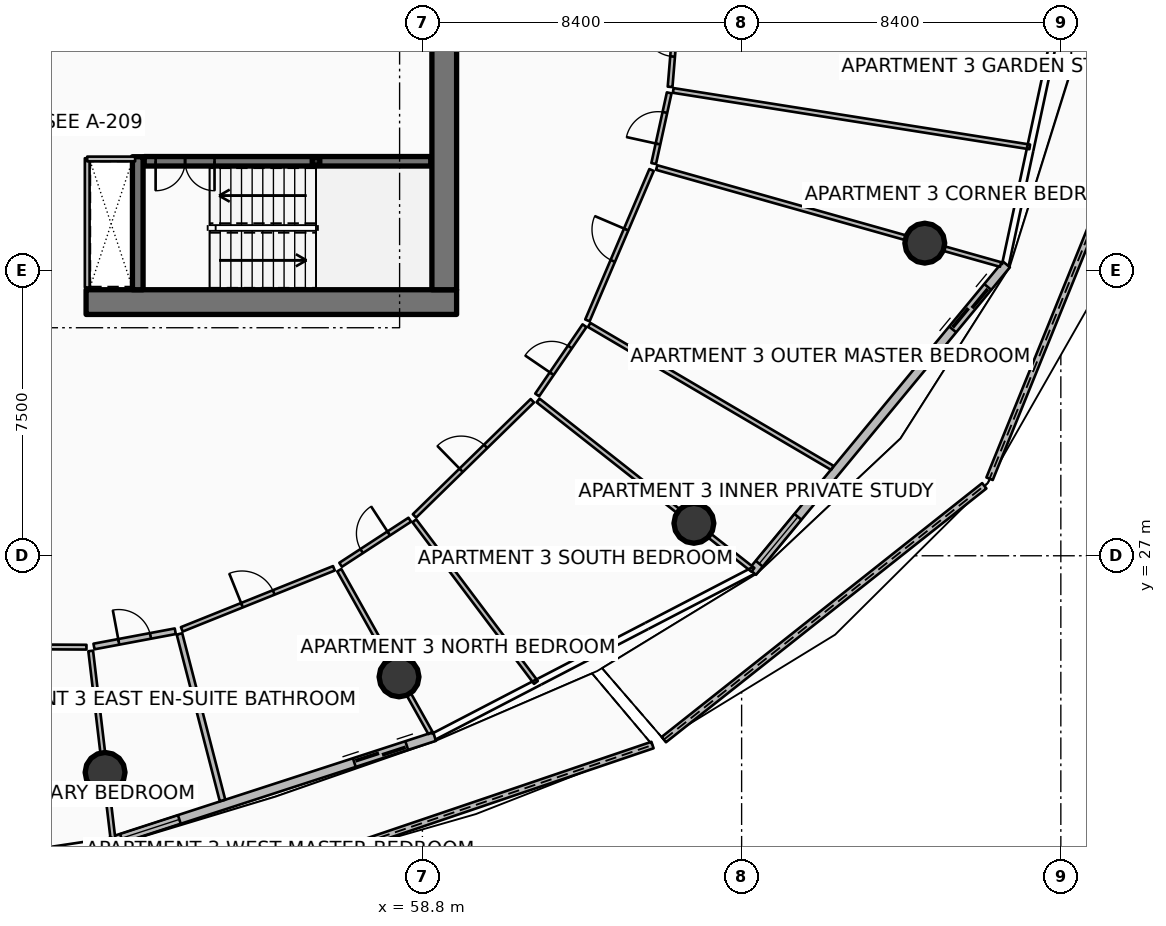
"""IFC4 building model, lengths in metres.
Left out: names, types, materials, properties, quantities, classifications, styles, units other than length and angle.
Written with IfcOpenShell. Run it as: python <this file> out.ifc"""

import sys

from ifc_helpers import new_model, si_unit, direction, frame, frame_2d, origin, origin_2d, place, context, subcontext, project, spatial, polyline, rectangle, hollow_rectangle, circle, outline, extrude, element, fill, save


model = new_model("IFC4")
c1 = context("Model", 3, precision=1e-05, world=origin(), true_north=direction((0.0, 1.0)))
c2 = subcontext(c1, "Body", "Model", "MODEL_VIEW")
j1 = project(units=[si_unit("LENGTHUNIT", "METRE"), si_unit("PLANEANGLEUNIT", "RADIAN")], contexts=[c1])
p1 = place(None, origin())
s1 = spatial("IfcSite", under=j1, at=p1, CompositionType="ELEMENT")
p2 = place(p1, origin())
s2 = spatial("IfcBuilding", under=s1, at=p2, CompositionType="ELEMENT")
p3 = place(p2, frame((0.0, 0.0, 187.8)))
s3 = spatial("IfcBuildingStorey", under=s2, at=p3, CompositionType="ELEMENT", Elevation=187.8)
p4 = place(p3, frame((49.95, 33.675, 0.0), z_axis=(0.0, 0.0, 1.0), x_axis=(1.0, 0.0, 0.0)))
e1 = element("IfcWall", 1, at=p4, inside=s3, PredefinedType="SHEAR", context=c2, shape_type="SweptSolid", body=[
    extrude(rectangle(XDim=9.75, YDim=0.65, at=frame_2d((4.875, 0.0))), origin(), (0.0, 0.0, 1.0), 3.75),
])
p5 = place(p3, frame((59.375, 34.0, 0.0), z_axis=(0.0, 0.0, 1.0), x_axis=(0.0, 1.0, 0.0)))
e2 = element("IfcWall", 2, at=p5, inside=s3, PredefinedType="SHEAR", context=c2, shape_type="SweptSolid", body=[
    extrude(rectangle(XDim=16.0, YDim=0.65, at=frame_2d((8.0, 0.0))), origin(), (0.0, 0.0, 1.0), 3.75),
])
p6 = place(p3, frame((51.31, 34.0, 0.0), z_axis=(0.0, 0.0, 1.0), x_axis=(0.0, 1.0, 0.0)))
e3 = element("IfcWall", 3, at=p6, inside=s3, PredefinedType="SHEAR", context=c2, shape_type="SweptSolid", body=[
    extrude(rectangle(XDim=3.5, YDim=0.28, at=frame_2d((1.75, 0.0))), origin(), (0.0, 0.0, 1.0), 3.75),
])
p7 = place(p3, frame((56.0, 37.38, 0.0), z_axis=(0.0, 0.0, 1.0), x_axis=(1.0, 0.0, 0.0)))
e4 = element("IfcColumn", 4, at=p7, inside=s3, PredefinedType="COLUMN", context=c2, shape_type="SweptSolid", body=[
    extrude(hollow_rectangle(XDim=0.2, YDim=0.2, WallThickness=0.01, InnerFilletRadius=0.01, OuterFilletRadius=0.02, at=origin_2d()), origin(), (0.0, 0.0, 1.0), 1.67),
])
for number, where, z_axis, x_axis in (
    (5, (50.45, 21.3, 0.0), (0.0, 0.0, 1.0), (1.0, 0.0, 0.0)),
    (6, (58.185, 23.814, 0.0), (0.0, 0.0, 1.0), (1.0, 0.0, 0.0)),
    (7, (65.944, 27.854, 0.0), (0.0, 0.0, 1.0), (1.0, 0.0, 0.0)),
    (8, (72.02, 35.226, 0.0), (0.0, 0.0, 1.0), (1.0, 0.0, 0.0)),
):
    element("IfcColumn", number, at=place(p3, frame(where, z_axis=z_axis, x_axis=x_axis)), inside=s3, PredefinedType="COLUMN", context=c2, shape_type="SweptSolid", body=[
        extrude(circle(Radius=0.525, at=origin_2d()), origin(), (0.0, 0.0, 1.0), 3.5),
    ])
p8 = place(p3, frame((55.634, 18.894, 0.0), z_axis=(0.0, 0.0, 1.0), x_axis=(0.947048433124, 0.32109074312, 0.0)))
e9 = element("IfcWall", 9, at=p8, inside=s3, PredefinedType="PARAPET", context=c2, shape_type="SweptSolid", body=[
    extrude(outline(polyline([(0.0, 0.0), (9.736, 0.0), (9.736, 1.747), (4.868, 1.562), (0.0, 1.348), (0.0, 0.0)])), frame((0.0, 0.09, 0.0), z_axis=(0.0, -1.0, 0.0), x_axis=(1.0, 0.0, 0.0)), (0.0, 0.0, 1.0), 0.18),
])
p9 = place(p3, frame((65.153, 22.163, 0.0), z_axis=(0.0, 0.0, 1.0), x_axis=(0.783919701346, 0.620862224524, 0.0)))
e10 = element("IfcWall", 10, at=p9, inside=s3, PredefinedType="PARAPET", context=c2, shape_type="SweptSolid", body=[
    extrude(outline(polyline([(0.0, 0.0), (10.756, 0.0), (10.756, 1.832), (5.378, 1.853), (0.0, 1.756), (0.0, 0.0)])), frame((0.0, 0.09, 0.0), z_axis=(0.0, -1.0, 0.0), x_axis=(1.0, 0.0, 0.0)), (0.0, 0.0, 1.0), 0.18),
])
p10 = place(p3, frame((73.725, 29.027, 0.0), z_axis=(0.0, 0.0, 1.0), x_axis=(0.375821400088, 0.926692114586, 0.0)))
e11 = element("IfcWall", 11, at=p10, inside=s3, PredefinedType="PARAPET", context=c2, shape_type="SweptSolid", body=[
    extrude(outline(polyline([(0.0, 0.0), (11.257, 0.0), (11.257, 1.497), (5.628, 1.696), (0.0, 1.832), (0.0, 0.0)])), frame((0.0, 0.09, 0.0), z_axis=(0.0, -1.0, 0.0), x_axis=(1.0, 0.0, 0.0)), (0.0, 0.0, 1.0), 0.18),
])
p11 = place(p3, frame((50.616, 19.481, 0.0), z_axis=(0.0, 0.0, 1.0), x_axis=(0.951058543936, 0.309010753869, 0.0)))
e12 = element("IfcWall", 12, at=p11, inside=s3, PredefinedType="SOLIDWALL", context=c2, shape_type="SweptSolid", body=[
    extrude(rectangle(XDim=8.942, YDim=0.24, at=frame_2d((4.471, 0.0))), origin(), (0.0, 0.0, 1.0), 2.45),
])
p12 = place(p11, frame((6.722, 0.0, 0.0)))
e13 = element("IfcOpeningElement", 13, at=p12, cuts=e12, PredefinedType="OPENING", context=c2, shape_type="SweptSolid", body=[
    extrude(rectangle(XDim=1.45, YDim=2.15, at=frame_2d((0.725, 1.075))), frame((0.0, 0.13, 0.0), z_axis=(0.0, -1.0, 0.0), x_axis=(1.0, 0.0, 0.0)), (0.0, 0.0, 1.0), 0.26),
])
p13 = place(p11, frame((0.28, 0.0, 0.65)))
e14 = element("IfcOpeningElement", 14, at=p13, cuts=e12, PredefinedType="OPENING", context=c2, shape_type="SweptSolid", body=[
    extrude(rectangle(XDim=1.6, YDim=1.5, at=frame_2d((0.8, 0.75))), frame((0.0, 0.13, 0.0), z_axis=(0.0, -1.0, 0.0), x_axis=(1.0, 0.0, 0.0)), (0.0, 0.0, 1.0), 0.26),
])
p14 = place(p3, frame((67.485, 26.576, 0.0), z_axis=(0.0, 0.0, 1.0), x_axis=(0.636759394418, 0.771062561418, 0.0)))
e15 = element("IfcWall", 15, at=p14, inside=s3, PredefinedType="SOLIDWALL", context=c2, shape_type="SweptSolid", body=[
    extrude(rectangle(XDim=10.494, YDim=0.24, at=frame_2d((5.247, 0.0))), origin(), (0.0, 0.0, 1.0), 2.45),
])
p15 = place(p14, frame((8.274, 0.0, 0.0)))
e16 = element("IfcOpeningElement", 16, at=p15, cuts=e15, PredefinedType="OPENING", context=c2, shape_type="SweptSolid", body=[
    extrude(rectangle(XDim=1.45, YDim=2.15, at=frame_2d((0.725, 1.075))), frame((0.0, 0.13, 0.0), z_axis=(0.0, -1.0, 0.0), x_axis=(1.0, 0.0, 0.0)), (0.0, 0.0, 1.0), 0.26),
])
p16 = place(p14, frame((0.28, 0.0, 0.65)))
e17 = element("IfcOpeningElement", 17, at=p16, cuts=e15, PredefinedType="OPENING", context=c2, shape_type="SweptSolid", body=[
    extrude(rectangle(XDim=1.6, YDim=1.5, at=frame_2d((0.8, 0.75))), frame((0.0, 0.13, 0.0), z_axis=(0.0, -1.0, 0.0), x_axis=(1.0, 0.0, 0.0)), (0.0, 0.0, 1.0), 0.26),
])
p17 = place(p3, frame((51.48, 37.38, 0.0), z_axis=(0.0, 0.0, 1.0), x_axis=(1.0, 0.0, 0.0)))
e18 = element("IfcWall", 18, at=p17, inside=s3, PredefinedType="SOLIDWALL", context=c2, shape_type="SweptSolid", body=[
    extrude(rectangle(XDim=7.54, YDim=0.25, at=frame_2d((3.77, 0.0))), origin(), (0.0, 0.0, 1.0), 3.5),
])
p18 = place(p17, frame((0.3, 0.0, 0.0)))
e19 = element("IfcOpeningElement", 19, at=p18, cuts=e18, PredefinedType="OPENING", context=c2, shape_type="SweptSolid", body=[
    extrude(rectangle(XDim=1.55, YDim=2.15, at=frame_2d((0.775, 1.075))), frame((0.0, 0.135, 0.0), z_axis=(0.0, -1.0, 0.0), x_axis=(1.0, 0.0, 0.0)), (0.0, 0.0, 1.0), 0.27),
])
p19 = place(p3, frame((49.98, 34.06, 0.0), z_axis=(0.0, 0.0, 1.0), x_axis=(0.0, 1.0, 0.0)))
e20 = element("IfcWall", 20, at=p19, inside=s3, PredefinedType="PARTITIONING", context=c2, shape_type="SweptSolid", body=[
    extrude(rectangle(XDim=3.4, YDim=0.125, at=frame_2d((1.7, 0.0))), origin(), (0.0, 0.0, 1.0), 2.94),
])
p20 = place(p3, frame((49.98, 37.44, 0.0), z_axis=(0.0, 0.0, 1.0), x_axis=(1.0, 0.0, 0.0)))
e21 = element("IfcWall", 21, at=p20, inside=s3, PredefinedType="PARTITIONING", context=c2, shape_type="SweptSolid", body=[
    extrude(rectangle(XDim=1.26, YDim=0.125, at=frame_2d((0.63, 0.0))), origin(), (0.0, 0.0, 1.0), 2.94),
])
p21 = place(p3, frame((45.842, 24.616, 0.0), z_axis=(0.0, 0.0, 1.0), x_axis=(0.999987001814, -0.00509864719, 0.0)))
e22 = element("IfcWall", 22, at=p21, inside=s3, PredefinedType="PARTITIONING", context=c2, shape_type="SweptSolid", body=[
    extrude(rectangle(XDim=4.118, YDim=0.125, at=frame_2d((2.059, 0.0))), origin(), (0.0, 0.0, 1.0), 2.94),
])
p22 = place(p21, frame((1.609, 0.0, 0.0)))
e23 = element("IfcOpeningElement", 23, at=p22, cuts=e22, PredefinedType="OPENING", context=c2, shape_type="SweptSolid", body=[
    extrude(rectangle(XDim=0.9, YDim=2.08, at=frame_2d((0.45, 1.04))), frame((0.0, 0.073, 0.0), z_axis=(0.0, -1.0, 0.0), x_axis=(1.0, 0.0, 0.0)), (0.0, 0.0, 1.0), 0.145),
])
p23 = place(p3, frame((50.072, 24.495, 0.0), z_axis=(0.0, 0.0, 1.0), x_axis=(0.11748042549, -0.993075198375, 0.0)))
e24 = element("IfcWall", 24, at=p23, inside=s3, PredefinedType="PARTITIONING", context=c2, shape_type="SweptSolid", body=[
    extrude(rectangle(XDim=5.008, YDim=0.125, at=frame_2d((2.504, 0.0))), origin(), (0.0, 0.0, 1.0), 2.94),
])
p24 = place(p3, frame((50.158, 24.613, 0.0), z_axis=(0.0, 0.0, 1.0), x_axis=(0.982858210634, 0.184363059718, 0.0)))
e25 = element("IfcWall", 25, at=p24, inside=s3, PredefinedType="PARTITIONING", context=c2, shape_type="SweptSolid", body=[
    extrude(rectangle(XDim=2.176, YDim=0.15, at=frame_2d((1.088, 0.0))), origin(), (0.0, 0.0, 1.0), 2.94),
])
p25 = place(p24, frame((0.663, 0.0, 0.0)))
e26 = element("IfcOpeningElement", 26, at=p25, cuts=e25, PredefinedType="OPENING", context=c2, shape_type="SweptSolid", body=[
    extrude(rectangle(XDim=0.85, YDim=2.06, at=frame_2d((0.425, 1.03))), frame((0.0, 0.085, 0.0), z_axis=(0.0, -1.0, 0.0), x_axis=(1.0, 0.0, 0.0)), (0.0, 0.0, 1.0), 0.17),
])
p26 = place(p3, frame((52.408, 24.943, 0.0), z_axis=(0.0, 0.0, 1.0), x_axis=(0.250196217184, -0.968195152284, 0.0)))
e27 = element("IfcWall", 27, at=p26, inside=s3, PredefinedType="PARTITIONING", context=c2, shape_type="SweptSolid", body=[
    extrude(rectangle(XDim=4.525, YDim=0.15, at=frame_2d((2.262, 0.0))), origin(), (0.0, 0.0, 1.0), 2.94),
])
p27 = place(p3, frame((52.469, 25.064, 0.0), z_axis=(0.0, 0.0, 1.0), x_axis=(0.928030941282, 0.372503116796, 0.0)))
e28 = element("IfcWall", 28, at=p27, inside=s3, PredefinedType="PARTITIONING", context=c2, shape_type="SweptSolid", body=[
    extrude(rectangle(XDim=4.312, YDim=0.125, at=frame_2d((2.156, 0.0))), origin(), (0.0, 0.0, 1.0), 2.94),
])
p28 = place(p27, frame((1.706, 0.0, 0.0)))
e29 = element("IfcOpeningElement", 29, at=p28, cuts=e28, PredefinedType="OPENING", context=c2, shape_type="SweptSolid", body=[
    extrude(rectangle(XDim=0.9, YDim=2.08, at=frame_2d((0.45, 1.04))), frame((0.0, 0.073, 0.0), z_axis=(0.0, -1.0, 0.0), x_axis=(1.0, 0.0, 0.0)), (0.0, 0.0, 1.0), 0.145),
])
p29 = place(p3, frame((56.613, 26.621, 0.0), z_axis=(0.0, 0.0, 1.0), x_axis=(0.488583679293, -0.872517041856, 0.0)))
e30 = element("IfcWall", 30, at=p29, inside=s3, PredefinedType="PARTITIONING", context=c2, shape_type="SweptSolid", body=[
    extrude(rectangle(XDim=4.908, YDim=0.125, at=frame_2d((2.454, 0.0))), origin(), (0.0, 0.0, 1.0), 2.94),
])
p30 = place(p3, frame((58.589, 27.92, 0.0), z_axis=(0.0, 0.0, 1.0), x_axis=(0.601049014417, -0.799212163489, 0.0)))
e31 = element("IfcWall", 31, at=p30, inside=s3, PredefinedType="PARTITIONING", context=c2, shape_type="SweptSolid", body=[
    extrude(rectangle(XDim=5.322, YDim=0.125, at=frame_2d((2.661, 0.0))), origin(), (0.0, 0.0, 1.0), 2.94),
])
p31 = place(p3, frame((56.648, 26.762, 0.0), z_axis=(0.0, 0.0, 1.0), x_axis=(0.837746976104, 0.546058608602, 0.0)))
e32 = element("IfcWall", 32, at=p31, inside=s3, PredefinedType="PARTITIONING", context=c2, shape_type="SweptSolid", body=[
    extrude(rectangle(XDim=2.172, YDim=0.125, at=frame_2d((1.086, 0.0))), origin(), (0.0, 0.0, 1.0), 2.94),
])
p32 = place(p31, frame((0.661, 0.0, 0.0)))
e33 = element("IfcOpeningElement", 33, at=p32, cuts=e32, PredefinedType="OPENING", context=c2, shape_type="SweptSolid", body=[
    extrude(rectangle(XDim=0.85, YDim=2.06, at=frame_2d((0.425, 1.03))), frame((0.0, 0.073, 0.0), z_axis=(0.0, -1.0, 0.0), x_axis=(1.0, 0.0, 0.0)), (0.0, 0.0, 1.0), 0.145),
])
p33 = place(p3, frame((58.592, 28.048, 0.0), z_axis=(0.0, 0.0, 1.0), x_axis=(0.715112359848, 0.699009522677, 0.0)))
e34 = element("IfcWall", 34, at=p33, inside=s3, PredefinedType="PARTITIONING", context=c2, shape_type="SweptSolid", body=[
    extrude(rectangle(XDim=4.336, YDim=0.125, at=frame_2d((2.168, 0.0))), origin(), (0.0, 0.0, 1.0), 2.94),
])
p34 = place(p33, frame((1.718, 0.0, 0.0)))
e35 = element("IfcOpeningElement", 35, at=p34, cuts=e34, PredefinedType="OPENING", context=c2, shape_type="SweptSolid", body=[
    extrude(rectangle(XDim=0.9, YDim=2.08, at=frame_2d((0.45, 1.04))), frame((0.0, 0.073, 0.0), z_axis=(0.0, -1.0, 0.0), x_axis=(1.0, 0.0, 0.0)), (0.0, 0.0, 1.0), 0.145),
])
p35 = place(p3, frame((61.843, 31.087, 0.0), z_axis=(0.0, 0.0, 1.0), x_axis=(0.785327813677, -0.619080144299, 0.0)))
e36 = element("IfcWall", 36, at=p35, inside=s3, PredefinedType="PARTITIONING", context=c2, shape_type="SweptSolid", body=[
    extrude(rectangle(XDim=7.2, YDim=0.125, at=frame_2d((3.6, 0.0))), origin(), (0.0, 0.0, 1.0), 2.94),
])
p36 = place(p3, frame((63.188, 33.074, 0.0), z_axis=(0.0, 0.0, 1.0), x_axis=(0.862139654636, -0.506670717433, 0.0)))
e37 = element("IfcWall", 37, at=p36, inside=s3, PredefinedType="PARTITIONING", context=c2, shape_type="SweptSolid", body=[
    extrude(rectangle(XDim=7.421, YDim=0.125, at=frame_2d((3.71, 0.0))), origin(), (0.0, 0.0, 1.0), 2.94),
])
p37 = place(p3, frame((61.821, 31.232, 0.0), z_axis=(0.0, 0.0, 1.0), x_axis=(0.56426341076, 0.82559481786, 0.0)))
e38 = element("IfcWall", 38, at=p37, inside=s3, PredefinedType="PARTITIONING", context=c2, shape_type="SweptSolid", body=[
    extrude(rectangle(XDim=2.207, YDim=0.125, at=frame_2d((1.103, 0.0))), origin(), (0.0, 0.0, 1.0), 2.94),
])
p38 = place(p37, frame((0.678, 0.0, 0.0)))
e39 = element("IfcOpeningElement", 39, at=p38, cuts=e38, PredefinedType="OPENING", context=c2, shape_type="SweptSolid", body=[
    extrude(rectangle(XDim=0.85, YDim=2.06, at=frame_2d((0.425, 1.03))), frame((0.0, 0.073, 0.0), z_axis=(0.0, -1.0, 0.0), x_axis=(1.0, 0.0, 0.0)), (0.0, 0.0, 1.0), 0.145),
])
p39 = place(p3, frame((63.142, 33.193, 0.0), z_axis=(0.0, 0.0, 1.0), x_axis=(0.392302335844, 0.919836331796, 0.0)))
e40 = element("IfcWall", 40, at=p39, inside=s3, PredefinedType="PARTITIONING", context=c2, shape_type="SweptSolid", body=[
    extrude(rectangle(XDim=4.302, YDim=0.125, at=frame_2d((2.151, 0.0))), origin(), (0.0, 0.0, 1.0), 2.94),
])
p40 = place(p39, frame((1.701, 0.0, 0.0)))
e41 = element("IfcOpeningElement", 41, at=p40, cuts=e40, PredefinedType="OPENING", context=c2, shape_type="SweptSolid", body=[
    extrude(rectangle(XDim=0.9, YDim=2.08, at=frame_2d((0.45, 1.04))), frame((0.0, 0.073, 0.0), z_axis=(0.0, -1.0, 0.0), x_axis=(1.0, 0.0, 0.0)), (0.0, 0.0, 1.0), 0.145),
])
p41 = place(p3, frame((64.965, 37.215, 0.0), z_axis=(0.0, 0.0, 1.0), x_axis=(0.962454024137, -0.271444748378, 0.0)))
e42 = element("IfcWall", 42, at=p41, inside=s3, PredefinedType="PARTITIONING", context=c2, shape_type="SweptSolid", body=[
    extrude(rectangle(XDim=9.403, YDim=0.125, at=frame_2d((4.702, 0.0))), origin(), (0.0, 0.0, 1.0), 2.94),
])
p42 = place(p3, frame((65.4, 39.244, 0.0), z_axis=(0.0, 0.0, 1.0), x_axis=(0.987688031288, -0.156436417916, 0.0)))
e43 = element("IfcWall", 43, at=p42, inside=s3, PredefinedType="PARTITIONING", context=c2, shape_type="SweptSolid", body=[
    extrude(rectangle(XDim=9.498, YDim=0.125, at=frame_2d((4.749, 0.0))), origin(), (0.0, 0.0, 1.0), 2.94),
])
p43 = place(p3, frame((64.886, 37.321, 0.0), z_axis=(0.0, 0.0, 1.0), x_axis=(0.214404311004, 0.976744998156, 0.0)))
e44 = element("IfcWall", 44, at=p43, inside=s3, PredefinedType="PARTITIONING", context=c2, shape_type="SweptSolid", body=[
    extrude(rectangle(XDim=1.904, YDim=0.125, at=frame_2d((0.952, 0.0))), origin(), (0.0, 0.0, 1.0), 2.94),
])
p44 = place(p43, frame((0.527, 0.0, 0.0)))
e45 = element("IfcOpeningElement", 45, at=p44, cuts=e44, PredefinedType="OPENING", context=c2, shape_type="SweptSolid", body=[
    extrude(rectangle(XDim=0.85, YDim=2.06, at=frame_2d((0.425, 1.03))), frame((0.0, 0.073, 0.0), z_axis=(0.0, -1.0, 0.0), x_axis=(1.0, 0.0, 0.0)), (0.0, 0.0, 1.0), 0.145),
])
p45 = place(p3, frame((65.318, 39.338, 0.0), z_axis=(0.0, 0.0, 1.0), x_axis=(0.082403040097, 0.996599086385, 0.0)))
e46 = element("IfcWall", 46, at=p45, inside=s3, PredefinedType="PARTITIONING", context=c2, shape_type="SweptSolid", body=[
    extrude(rectangle(XDim=2.453, YDim=0.125, at=frame_2d((1.227, 0.0))), origin(), (0.0, 0.0, 1.0), 2.94),
])
p46 = place(p45, frame((0.802, 0.0, 0.0)))
e47 = element("IfcOpeningElement", 47, at=p46, cuts=e46, PredefinedType="OPENING", context=c2, shape_type="SweptSolid", body=[
    extrude(rectangle(XDim=0.85, YDim=2.06, at=frame_2d((0.425, 1.03))), frame((0.0, 0.073, 0.0), z_axis=(0.0, -1.0, 0.0), x_axis=(1.0, 0.0, 0.0)), (0.0, 0.0, 1.0), 0.145),
])
p47 = place(p12, origin())
e48 = element("IfcDoor", 48, at=p47, inside=s3, OperationType="DOUBLE_DOOR_SLIDING", PredefinedType="DOOR", context=c2, shape_type="SweptSolid", body=[
    extrude(rectangle(XDim=1.45, YDim=2.15, at=frame_2d((0.725, 1.075))), frame((0.0, 0.025, 0.0), z_axis=(0.0, -1.0, 0.0), x_axis=(1.0, 0.0, 0.0)), (0.0, 0.0, 1.0), 0.05),
])
fill(e13, e48)
p48 = place(p13, origin())
e49 = element("IfcWindow", 49, at=p48, inside=s3, PartitioningType="SINGLE_PANEL", PredefinedType="WINDOW", context=c2, shape_type="SweptSolid", body=[
    extrude(rectangle(XDim=1.6, YDim=1.5, at=frame_2d((0.8, 0.75))), frame((0.0, 0.03, 0.0), z_axis=(0.0, -1.0, 0.0), x_axis=(1.0, 0.0, 0.0)), (0.0, 0.0, 1.0), 0.06),
])
fill(e14, e49)
p49 = place(p15, origin())
e50 = element("IfcDoor", 50, at=p49, inside=s3, OperationType="DOUBLE_DOOR_SLIDING", PredefinedType="DOOR", context=c2, shape_type="SweptSolid", body=[
    extrude(rectangle(XDim=1.45, YDim=2.15, at=frame_2d((0.725, 1.075))), frame((0.0, 0.025, 0.0), z_axis=(0.0, -1.0, 0.0), x_axis=(1.0, 0.0, 0.0)), (0.0, 0.0, 1.0), 0.05),
])
fill(e16, e50)
p50 = place(p16, origin())
e51 = element("IfcWindow", 51, at=p50, inside=s3, PartitioningType="SINGLE_PANEL", PredefinedType="WINDOW", context=c2, shape_type="SweptSolid", body=[
    extrude(rectangle(XDim=1.6, YDim=1.5, at=frame_2d((0.8, 0.75))), frame((0.0, 0.03, 0.0), z_axis=(0.0, -1.0, 0.0), x_axis=(1.0, 0.0, 0.0)), (0.0, 0.0, 1.0), 0.06),
])
fill(e17, e51)
p51 = place(p18, origin())
e52 = element("IfcDoor", 52, at=p51, inside=s3, OperationType="DOUBLE_DOOR_SINGLE_SWING", PredefinedType="DOOR", context=c2, shape_type="SweptSolid", body=[
    extrude(rectangle(XDim=1.55, YDim=2.15, at=frame_2d((0.775, 1.075))), frame((0.0, 0.025, 0.0), z_axis=(0.0, -1.0, 0.0), x_axis=(1.0, 0.0, 0.0)), (0.0, 0.0, 1.0), 0.05),
])
fill(e19, e52)
p52 = place(p25, origin())
e53 = element("IfcDoor", 53, at=p52, inside=s3, OperationType="SINGLE_SWING_LEFT", PredefinedType="DOOR", context=c2, shape_type="SweptSolid", body=[
    extrude(rectangle(XDim=0.85, YDim=2.06, at=frame_2d((0.425, 1.03))), frame((0.0, 0.025, 0.0), z_axis=(0.0, -1.0, 0.0), x_axis=(1.0, 0.0, 0.0)), (0.0, 0.0, 1.0), 0.05),
])
fill(e26, e53)
p53 = place(p28, origin())
e54 = element("IfcDoor", 54, at=p53, inside=s3, OperationType="SINGLE_SWING_LEFT", PredefinedType="DOOR", context=c2, shape_type="SweptSolid", body=[
    extrude(rectangle(XDim=0.9, YDim=2.08, at=frame_2d((0.45, 1.04))), frame((0.0, 0.025, 0.0), z_axis=(0.0, -1.0, 0.0), x_axis=(1.0, 0.0, 0.0)), (0.0, 0.0, 1.0), 0.05),
])
fill(e29, e54)
p54 = place(p32, origin())
e55 = element("IfcDoor", 55, at=p54, inside=s3, OperationType="SINGLE_SWING_RIGHT", PredefinedType="DOOR", context=c2, shape_type="SweptSolid", body=[
    extrude(rectangle(XDim=0.85, YDim=2.06, at=frame_2d((0.425, 1.03))), frame((0.0, 0.025, 0.0), z_axis=(0.0, -1.0, 0.0), x_axis=(1.0, 0.0, 0.0)), (0.0, 0.0, 1.0), 0.05),
])
fill(e33, e55)
p55 = place(p34, origin())
e56 = element("IfcDoor", 56, at=p55, inside=s3, OperationType="SINGLE_SWING_LEFT", PredefinedType="DOOR", context=c2, shape_type="SweptSolid", body=[
    extrude(rectangle(XDim=0.9, YDim=2.08, at=frame_2d((0.45, 1.04))), frame((0.0, 0.025, 0.0), z_axis=(0.0, -1.0, 0.0), x_axis=(1.0, 0.0, 0.0)), (0.0, 0.0, 1.0), 0.05),
])
fill(e35, e56)
p56 = place(p38, origin())
e57 = element("IfcDoor", 57, at=p56, inside=s3, OperationType="SINGLE_SWING_LEFT", PredefinedType="DOOR", context=c2, shape_type="SweptSolid", body=[
    extrude(rectangle(XDim=0.85, YDim=2.06, at=frame_2d((0.425, 1.03))), frame((0.0, 0.025, 0.0), z_axis=(0.0, -1.0, 0.0), x_axis=(1.0, 0.0, 0.0)), (0.0, 0.0, 1.0), 0.05),
])
fill(e39, e57)
p57 = place(p40, origin())
e58 = element("IfcDoor", 58, at=p57, inside=s3, OperationType="SINGLE_SWING_RIGHT", PredefinedType="DOOR", context=c2, shape_type="SweptSolid", body=[
    extrude(rectangle(XDim=0.9, YDim=2.08, at=frame_2d((0.45, 1.04))), frame((0.0, 0.025, 0.0), z_axis=(0.0, -1.0, 0.0), x_axis=(1.0, 0.0, 0.0)), (0.0, 0.0, 1.0), 0.05),
])
fill(e41, e58)
p58 = place(p44, origin())
e59 = element("IfcDoor", 59, at=p58, inside=s3, OperationType="SINGLE_SWING_LEFT", PredefinedType="DOOR", context=c2, shape_type="SweptSolid", body=[
    extrude(rectangle(XDim=0.85, YDim=2.06, at=frame_2d((0.425, 1.03))), frame((0.0, 0.025, 0.0), z_axis=(0.0, -1.0, 0.0), x_axis=(1.0, 0.0, 0.0)), (0.0, 0.0, 1.0), 0.05),
])
fill(e45, e59)
p59 = place(p46, origin())
e60 = element("IfcDoor", 60, at=p59, inside=s3, OperationType="SINGLE_SWING_RIGHT", PredefinedType="DOOR", context=c2, shape_type="SweptSolid", body=[
    extrude(rectangle(XDim=0.85, YDim=2.06, at=frame_2d((0.425, 1.03))), frame((0.0, 0.025, 0.0), z_axis=(0.0, -1.0, 0.0), x_axis=(1.0, 0.0, 0.0)), (0.0, 0.0, 1.0), 0.05),
])
fill(e47, e60)
save(model, sys.argv[1])
